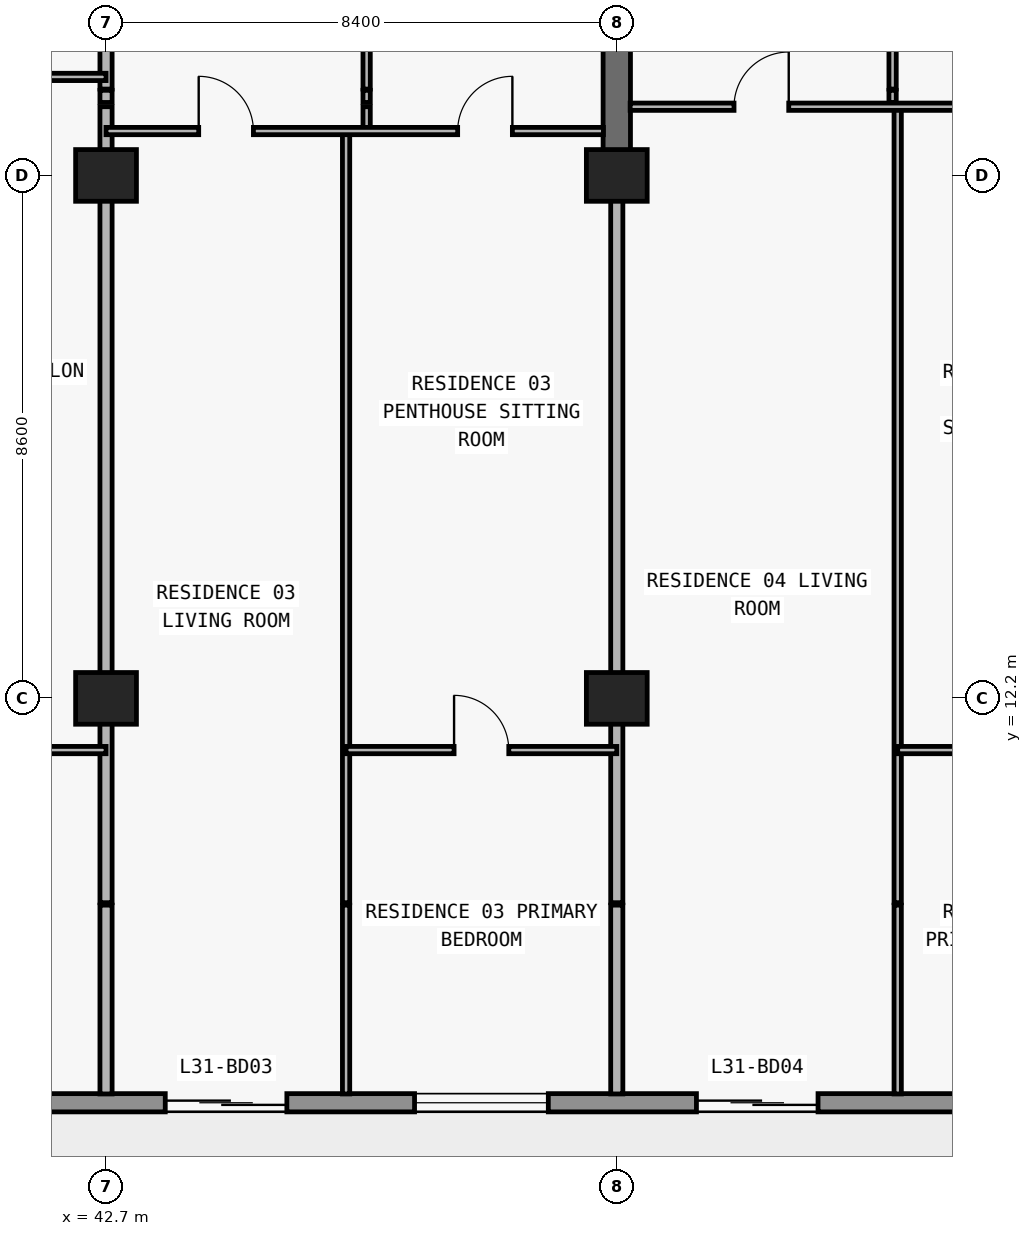
"""IFC4 building model, lengths in metres.
Left out: names, types, materials, properties, quantities, classifications, styles, units other than length and angle.
Written with IfcOpenShell. Run it as: python <this file> out.ifc"""

import sys

from ifc_helpers import new_model, si_unit, direction, frame, frame_2d, origin, origin_2d, place, context, subcontext, project, spatial, rectangle, extrude, element, fill, save


model = new_model("IFC4")
c1 = context("Model", 3, precision=1e-05, world=origin(), true_north=direction((0.0, 1.0)))
c2 = subcontext(c1, "Body", "Model", "MODEL_VIEW")
j1 = project(units=[si_unit("LENGTHUNIT", "METRE"), si_unit("PLANEANGLEUNIT", "RADIAN")], contexts=[c1])
p1 = place(None, origin())
s1 = spatial("IfcSite", under=j1, at=p1, CompositionType="ELEMENT")
p2 = place(p1, origin())
s2 = spatial("IfcBuilding", under=s1, at=p2, CompositionType="ELEMENT")
p3 = place(p2, frame((0.0, 0.0, 115.8)))
s3 = spatial("IfcBuildingStorey", under=s2, at=p3, CompositionType="ELEMENT", Elevation=115.8)
for number, where, z_axis, x_axis in (
    (1, (42.7, 12.2, 0.0), (0.0, 0.0, 1.0), (1.0, 0.0, 0.0)),
    (2, (51.1, 12.2, 0.0), (0.0, 0.0, 1.0), (1.0, 0.0, 0.0)),
    (3, (42.7, 20.8, 0.0), (0.0, 0.0, 1.0), (1.0, 0.0, 0.0)),
    (4, (51.1, 20.8, 0.0), (0.0, 0.0, 1.0), (1.0, 0.0, 0.0)),
):
    element("IfcColumn", number, at=place(p3, frame(where, z_axis=z_axis, x_axis=x_axis)), inside=s3, PredefinedType="COLUMN", context=c2, shape_type="SweptSolid", body=[
        extrude(rectangle(XDim=1.0, YDim=0.85, at=origin_2d()), origin(), (0.0, 0.0, 1.0), 3.05),
    ])
p4 = place(p3, frame((51.1, 20.8, 0.0), z_axis=(0.0, 0.0, 1.0), x_axis=(0.0, 1.0, 0.0)))
e5 = element("IfcWall", 5, at=p4, inside=s3, PredefinedType="SHEAR", context=c2, shape_type="SweptSolid", body=[
    extrude(rectangle(XDim=8.6, YDim=0.45, at=frame_2d((4.3, 0.0))), origin(), (0.0, 0.0, 1.0), 3.05),
])
p5 = place(p3, frame((70.1, 5.55, 0.0), z_axis=(0.0, 0.0, 1.0), x_axis=(-1.0, 0.0, 0.0)))
e6 = element("IfcWall", 6, at=p5, inside=s3, PredefinedType="STANDARD", context=c2, shape_type="SweptSolid", body=[
    extrude(rectangle(XDim=62.4, YDim=0.3, at=frame_2d((31.2, 0.0))), origin(), (0.0, 0.0, 1.0), 3.05),
])
p6 = place(p5, frame((57.29, 0.0, 0.0)))
e7 = element("IfcOpeningElement", 7, at=p6, cuts=e6, PredefinedType="OPENING", context=c2, shape_type="SweptSolid", body=[
    extrude(rectangle(XDim=2.0, YDim=2.3, at=frame_2d((1.0, 1.15))), frame((0.0, 0.16, 0.0), z_axis=(0.0, -1.0, 0.0), x_axis=(1.0, 0.0, 0.0)), (0.0, 0.0, 1.0), 0.32),
])
p7 = place(p5, frame((52.61, 0.0, 0.65)))
e8 = element("IfcOpeningElement", 8, at=p7, cuts=e6, PredefinedType="OPENING", context=c2, shape_type="SweptSolid", body=[
    extrude(rectangle(XDim=2.6, YDim=1.85, at=frame_2d((1.3, 0.925))), frame((0.0, 0.16, 0.0), z_axis=(0.0, -1.0, 0.0), x_axis=(1.0, 0.0, 0.0)), (0.0, 0.0, 1.0), 0.32),
])
p8 = place(p5, frame((46.5, 0.0, 0.85)))
e9 = element("IfcOpeningElement", 9, at=p8, cuts=e6, PredefinedType="OPENING", context=c2, shape_type="SweptSolid", body=[
    extrude(rectangle(XDim=2.2, YDim=1.55, at=frame_2d((1.1, 0.775))), frame((0.0, 0.16, 0.0), z_axis=(0.0, -1.0, 0.0), x_axis=(1.0, 0.0, 0.0)), (0.0, 0.0, 1.0), 0.32),
])
p9 = place(p5, frame((40.49, 0.0, 0.0)))
e10 = element("IfcOpeningElement", 10, at=p9, cuts=e6, PredefinedType="OPENING", context=c2, shape_type="SweptSolid", body=[
    extrude(rectangle(XDim=2.0, YDim=2.3, at=frame_2d((1.0, 1.15))), frame((0.0, 0.16, 0.0), z_axis=(0.0, -1.0, 0.0), x_axis=(1.0, 0.0, 0.0)), (0.0, 0.0, 1.0), 0.32),
])
p10 = place(p5, frame((35.81, 0.0, 0.65)))
e11 = element("IfcOpeningElement", 11, at=p10, cuts=e6, PredefinedType="OPENING", context=c2, shape_type="SweptSolid", body=[
    extrude(rectangle(XDim=2.6, YDim=1.85, at=frame_2d((1.3, 0.925))), frame((0.0, 0.16, 0.0), z_axis=(0.0, -1.0, 0.0), x_axis=(1.0, 0.0, 0.0)), (0.0, 0.0, 1.0), 0.32),
])
p11 = place(p5, frame((30.1, 0.0, 0.85)))
e12 = element("IfcOpeningElement", 12, at=p11, cuts=e6, PredefinedType="OPENING", context=c2, shape_type="SweptSolid", body=[
    extrude(rectangle(XDim=2.2, YDim=1.55, at=frame_2d((1.1, 0.775))), frame((0.0, 0.16, 0.0), z_axis=(0.0, -1.0, 0.0), x_axis=(1.0, 0.0, 0.0)), (0.0, 0.0, 1.0), 0.32),
])
p12 = place(p5, frame((24.426, 0.0, 0.0)))
e13 = element("IfcOpeningElement", 13, at=p12, cuts=e6, PredefinedType="OPENING", context=c2, shape_type="SweptSolid", body=[
    extrude(rectangle(XDim=2.0, YDim=2.3, at=frame_2d((1.0, 1.15))), frame((0.0, 0.16, 0.0), z_axis=(0.0, -1.0, 0.0), x_axis=(1.0, 0.0, 0.0)), (0.0, 0.0, 1.0), 0.32),
])
p13 = place(p5, frame((20.126, 0.0, 0.85)))
e14 = element("IfcOpeningElement", 14, at=p13, cuts=e6, PredefinedType="OPENING", context=c2, shape_type="SweptSolid", body=[
    extrude(rectangle(XDim=2.2, YDim=1.55, at=frame_2d((1.1, 0.775))), frame((0.0, 0.16, 0.0), z_axis=(0.0, -1.0, 0.0), x_axis=(1.0, 0.0, 0.0)), (0.0, 0.0, 1.0), 0.32),
])
p14 = place(p5, frame((15.69, 0.0, 0.0)))
e15 = element("IfcOpeningElement", 15, at=p14, cuts=e6, PredefinedType="OPENING", context=c2, shape_type="SweptSolid", body=[
    extrude(rectangle(XDim=2.0, YDim=2.3, at=frame_2d((1.0, 1.15))), frame((0.0, 0.16, 0.0), z_axis=(0.0, -1.0, 0.0), x_axis=(1.0, 0.0, 0.0)), (0.0, 0.0, 1.0), 0.32),
])
p15 = place(p5, frame((11.59, 0.0, 0.85)))
e16 = element("IfcOpeningElement", 16, at=p15, cuts=e6, PredefinedType="OPENING", context=c2, shape_type="SweptSolid", body=[
    extrude(rectangle(XDim=1.8, YDim=1.55, at=frame_2d((0.9, 0.775))), frame((0.0, 0.16, 0.0), z_axis=(0.0, -1.0, 0.0), x_axis=(1.0, 0.0, 0.0)), (0.0, 0.0, 1.0), 0.32),
])
p16 = place(p5, frame((7.626, 0.0, 0.0)))
e17 = element("IfcOpeningElement", 17, at=p16, cuts=e6, PredefinedType="OPENING", context=c2, shape_type="SweptSolid", body=[
    extrude(rectangle(XDim=2.0, YDim=2.3, at=frame_2d((1.0, 1.15))), frame((0.0, 0.16, 0.0), z_axis=(0.0, -1.0, 0.0), x_axis=(1.0, 0.0, 0.0)), (0.0, 0.0, 1.0), 0.32),
])
p17 = place(p5, frame((3.326, 0.0, 0.85)))
e18 = element("IfcOpeningElement", 18, at=p17, cuts=e6, PredefinedType="OPENING", context=c2, shape_type="SweptSolid", body=[
    extrude(rectangle(XDim=2.2, YDim=1.55, at=frame_2d((1.1, 0.775))), frame((0.0, 0.16, 0.0), z_axis=(0.0, -1.0, 0.0), x_axis=(1.0, 0.0, 0.0)), (0.0, 0.0, 1.0), 0.32),
])
p18 = place(p3, frame((42.7, 5.695, 0.0), z_axis=(0.0, 0.0, 1.0), x_axis=(0.0, 1.0, 0.0)))
e19 = element("IfcWall", 19, at=p18, inside=s3, PredefinedType="PARTITIONING", context=c2, shape_type="SweptSolid", body=[
    extrude(rectangle(XDim=3.105, YDim=0.2, at=frame_2d((1.552, 0.0))), origin(), (0.0, 0.0, 1.0), 3.05),
])
p19 = place(p3, frame((42.7, 8.84, 0.0), z_axis=(0.0, 0.0, 1.0), x_axis=(0.0, 1.0, 0.0)))
e20 = element("IfcWall", 20, at=p19, inside=s3, PredefinedType="PARTITIONING", context=c2, shape_type="SweptSolid", body=[
    extrude(rectangle(XDim=13.09, YDim=0.2, at=frame_2d((6.545, 0.0))), origin(), (0.0, 0.0, 1.0), 2.174),
])
p20 = place(p3, frame((42.7, 22.0, 0.0), z_axis=(0.0, 0.0, 1.0), x_axis=(0.0, 1.0, 0.0)))
e21 = element("IfcWall", 21, at=p20, inside=s3, PredefinedType="PARTITIONING", context=c2, shape_type="SweptSolid", body=[
    extrude(rectangle(XDim=0.2, YDim=0.2, at=frame_2d((0.1, 0.0))), origin(), (0.0, 0.0, 1.0), 2.174),
])
p21 = place(p3, frame((42.7, 22.22, 0.0), z_axis=(0.0, 0.0, 1.0), x_axis=(0.0, 1.0, 0.0)))
e22 = element("IfcWall", 22, at=p21, inside=s3, PredefinedType="PARTITIONING", context=c2, shape_type="SweptSolid", body=[
    extrude(rectangle(XDim=4.38, YDim=0.2, at=frame_2d((2.19, 0.0))), origin(), (0.0, 0.0, 1.0), 2.174),
])
p22 = place(p3, frame((46.648, 5.695, 0.0), z_axis=(0.0, 0.0, 1.0), x_axis=(0.0, 1.0, 0.0)))
e23 = element("IfcWall", 23, at=p22, inside=s3, PredefinedType="PARTITIONING", context=c2, shape_type="SweptSolid", body=[
    extrude(rectangle(XDim=3.105, YDim=0.12, at=frame_2d((1.552, 0.0))), origin(), (0.0, 0.0, 1.0), 3.05),
])
p23 = place(p3, frame((46.648, 8.84, 0.0), z_axis=(0.0, 0.0, 1.0), x_axis=(0.0, 1.0, 0.0)))
e24 = element("IfcWall", 24, at=p23, inside=s3, PredefinedType="PARTITIONING", context=c2, shape_type="SweptSolid", body=[
    extrude(rectangle(XDim=12.69, YDim=0.12, at=frame_2d((6.345, 0.0))), origin(), (0.0, 0.0, 1.0), 3.05),
])
p24 = place(p3, frame((46.986, 21.53, 0.0), z_axis=(0.0, 0.0, 1.0), x_axis=(0.0, 1.0, 0.0)))
e25 = element("IfcWall", 25, at=p24, inside=s3, PredefinedType="PARTITIONING", context=c2, shape_type="SweptSolid", body=[
    extrude(rectangle(XDim=0.4, YDim=0.12, at=frame_2d((0.2, 0.0))), origin(), (0.0, 0.0, 1.0), 3.05),
])
p25 = place(p3, frame((46.986, 22.0, 0.0), z_axis=(0.0, 0.0, 1.0), x_axis=(0.0, 1.0, 0.0)))
e26 = element("IfcWall", 26, at=p25, inside=s3, PredefinedType="PARTITIONING", context=c2, shape_type="SweptSolid", body=[
    extrude(rectangle(XDim=0.2, YDim=0.12, at=frame_2d((0.1, 0.0))), origin(), (0.0, 0.0, 1.0), 3.05),
])
p26 = place(p3, frame((46.986, 22.22, 0.0), z_axis=(0.0, 0.0, 1.0), x_axis=(0.0, 1.0, 0.0)))
e27 = element("IfcWall", 27, at=p26, inside=s3, PredefinedType="PARTITIONING", context=c2, shape_type="SweptSolid", body=[
    extrude(rectangle(XDim=4.38, YDim=0.12, at=frame_2d((2.19, 0.0))), origin(), (0.0, 0.0, 1.0), 3.05),
])
p27 = place(p26, frame((1.74, 0.0, 0.0)))
e28 = element("IfcOpeningElement", 28, at=p27, cuts=e27, PredefinedType="OPENING", context=c2, shape_type="SweptSolid", body=[
    extrude(rectangle(XDim=0.9, YDim=2.15, at=frame_2d((0.45, 1.075))), frame((0.0, 0.07, 0.0), z_axis=(0.0, -1.0, 0.0), x_axis=(1.0, 0.0, 0.0)), (0.0, 0.0, 1.0), 0.14),
])
p28 = place(p3, frame((51.1, 5.695, 0.0), z_axis=(0.0, 0.0, 1.0), x_axis=(0.0, 1.0, 0.0)))
e29 = element("IfcWall", 29, at=p28, inside=s3, PredefinedType="PARTITIONING", context=c2, shape_type="SweptSolid", body=[
    extrude(rectangle(XDim=3.105, YDim=0.2, at=frame_2d((1.552, 0.0))), origin(), (0.0, 0.0, 1.0), 3.05),
])
p29 = place(p3, frame((51.1, 8.84, 0.0), z_axis=(0.0, 0.0, 1.0), x_axis=(0.0, 1.0, 0.0)))
e30 = element("IfcWall", 30, at=p29, inside=s3, PredefinedType="PARTITIONING", context=c2, shape_type="SweptSolid", body=[
    extrude(rectangle(XDim=11.955, YDim=0.2, at=frame_2d((5.978, 0.0))), origin(), (0.0, 0.0, 1.0), 2.174),
])
p30 = place(p3, frame((55.636, 22.0, 0.0), z_axis=(0.0, 0.0, 1.0), x_axis=(0.0, 1.0, 0.0)))
e31 = element("IfcWall", 31, at=p30, inside=s3, PredefinedType="PARTITIONING", context=c2, shape_type="SweptSolid", body=[
    extrude(rectangle(XDim=0.2, YDim=0.12, at=frame_2d((0.1, 0.0))), origin(), (0.0, 0.0, 1.0), 3.05),
])
p31 = place(p3, frame((55.636, 22.22, 0.0), z_axis=(0.0, 0.0, 1.0), x_axis=(0.0, 1.0, 0.0)))
e32 = element("IfcWall", 32, at=p31, inside=s3, PredefinedType="PARTITIONING", context=c2, shape_type="SweptSolid", body=[
    extrude(rectangle(XDim=4.38, YDim=0.12, at=frame_2d((2.19, 0.0))), origin(), (0.0, 0.0, 1.0), 3.05),
])
p32 = place(p31, frame((1.74, 0.0, 0.0)))
e33 = element("IfcOpeningElement", 33, at=p32, cuts=e32, PredefinedType="OPENING", context=c2, shape_type="SweptSolid", body=[
    extrude(rectangle(XDim=0.9, YDim=2.15, at=frame_2d((0.45, 1.075))), frame((0.0, 0.07, 0.0), z_axis=(0.0, -1.0, 0.0), x_axis=(1.0, 0.0, 0.0)), (0.0, 0.0, 1.0), 0.14),
])
p33 = place(p3, frame((55.72, 5.695, 0.0), z_axis=(0.0, 0.0, 1.0), x_axis=(0.0, 1.0, 0.0)))
e34 = element("IfcWall", 34, at=p33, inside=s3, PredefinedType="PARTITIONING", context=c2, shape_type="SweptSolid", body=[
    extrude(rectangle(XDim=3.105, YDim=0.12, at=frame_2d((1.552, 0.0))), origin(), (0.0, 0.0, 1.0), 3.05),
])
p34 = place(p3, frame((55.72, 8.84, 0.0), z_axis=(0.0, 0.0, 1.0), x_axis=(0.0, 1.0, 0.0)))
e35 = element("IfcWall", 35, at=p34, inside=s3, PredefinedType="PARTITIONING", context=c2, shape_type="SweptSolid", body=[
    extrude(rectangle(XDim=13.09, YDim=0.12, at=frame_2d((6.545, 0.0))), origin(), (0.0, 0.0, 1.0), 3.05),
])
p35 = place(p3, frame((35.1, 11.35, 0.0), z_axis=(0.0, 0.0, 1.0), x_axis=(1.0, 0.0, 0.0)))
e36 = element("IfcWall", 36, at=p35, inside=s3, PredefinedType="PARTITIONING", context=c2, shape_type="SweptSolid", body=[
    extrude(rectangle(XDim=7.6, YDim=0.12, at=frame_2d((3.8, 0.0))), origin(), (0.0, 0.0, 1.0), 3.05),
])
p36 = place(p35, frame((3.35, 0.0, 0.0)))
e37 = element("IfcOpeningElement", 37, at=p36, cuts=e36, PredefinedType="OPENING", context=c2, shape_type="SweptSolid", body=[
    extrude(rectangle(XDim=0.9, YDim=2.15, at=frame_2d((0.45, 1.075))), frame((0.0, 0.07, 0.0), z_axis=(0.0, -1.0, 0.0), x_axis=(1.0, 0.0, 0.0)), (0.0, 0.0, 1.0), 0.14),
])
p37 = place(p3, frame((46.648, 11.35, 0.0), z_axis=(0.0, 0.0, 1.0), x_axis=(1.0, 0.0, 0.0)))
e38 = element("IfcWall", 38, at=p37, inside=s3, PredefinedType="PARTITIONING", context=c2, shape_type="SweptSolid", body=[
    extrude(rectangle(XDim=4.452, YDim=0.12, at=frame_2d((2.226, 0.0))), origin(), (0.0, 0.0, 1.0), 3.05),
])
p38 = place(p37, frame((1.776, 0.0, 0.0)))
e39 = element("IfcOpeningElement", 39, at=p38, cuts=e38, PredefinedType="OPENING", context=c2, shape_type="SweptSolid", body=[
    extrude(rectangle(XDim=0.9, YDim=2.15, at=frame_2d((0.45, 1.075))), frame((0.0, 0.07, 0.0), z_axis=(0.0, -1.0, 0.0), x_axis=(1.0, 0.0, 0.0)), (0.0, 0.0, 1.0), 0.14),
])
p39 = place(p3, frame((55.72, 11.35, 0.0), z_axis=(0.0, 0.0, 1.0), x_axis=(1.0, 0.0, 0.0)))
e40 = element("IfcWall", 40, at=p39, inside=s3, PredefinedType="PARTITIONING", context=c2, shape_type="SweptSolid", body=[
    extrude(rectangle(XDim=3.78, YDim=0.12, at=frame_2d((1.89, 0.0))), origin(), (0.0, 0.0, 1.0), 3.05),
])
p40 = place(p39, frame((1.44, 0.0, 0.0)))
e41 = element("IfcOpeningElement", 41, at=p40, cuts=e40, PredefinedType="OPENING", context=c2, shape_type="SweptSolid", body=[
    extrude(rectangle(XDim=0.9, YDim=2.15, at=frame_2d((0.45, 1.075))), frame((0.0, 0.07, 0.0), z_axis=(0.0, -1.0, 0.0), x_axis=(1.0, 0.0, 0.0)), (0.0, 0.0, 1.0), 0.14),
])
p41 = place(p3, frame((42.7, 21.53, 0.0), z_axis=(0.0, 0.0, 1.0), x_axis=(1.0, 0.0, 0.0)))
e42 = element("IfcWall", 42, at=p41, inside=s3, PredefinedType="PARTITIONING", context=c2, shape_type="SweptSolid", body=[
    extrude(rectangle(XDim=8.18, YDim=0.12, at=frame_2d((4.09, 0.0))), origin(), (0.0, 0.0, 1.0), 3.05),
])
p42 = place(p41, frame((1.524, 0.0, 0.0)))
e43 = element("IfcOpeningElement", 43, at=p42, cuts=e42, PredefinedType="OPENING", context=c2, shape_type="SweptSolid", body=[
    extrude(rectangle(XDim=0.9, YDim=2.15, at=frame_2d((0.45, 1.075))), frame((0.0, 0.07, 0.0), z_axis=(0.0, -1.0, 0.0), x_axis=(1.0, 0.0, 0.0)), (0.0, 0.0, 1.0), 0.14),
])
p43 = place(p41, frame((5.783, 0.0, 0.0)))
e44 = element("IfcOpeningElement", 44, at=p43, cuts=e42, PredefinedType="OPENING", context=c2, shape_type="SweptSolid", body=[
    extrude(rectangle(XDim=0.9, YDim=2.15, at=frame_2d((0.45, 1.075))), frame((0.0, 0.07, 0.0), z_axis=(0.0, -1.0, 0.0), x_axis=(1.0, 0.0, 0.0)), (0.0, 0.0, 1.0), 0.14),
])
p44 = place(p3, frame((51.32, 21.93, 0.0), z_axis=(0.0, 0.0, 1.0), x_axis=(1.0, 0.0, 0.0)))
e45 = element("IfcWall", 45, at=p44, inside=s3, PredefinedType="PARTITIONING", context=c2, shape_type="SweptSolid", body=[
    extrude(rectangle(XDim=8.18, YDim=0.12, at=frame_2d((4.09, 0.0))), origin(), (0.0, 0.0, 1.0), 3.05),
])
p45 = place(p44, frame((1.708, 0.0, 0.0)))
e46 = element("IfcOpeningElement", 46, at=p45, cuts=e45, PredefinedType="OPENING", context=c2, shape_type="SweptSolid", body=[
    extrude(rectangle(XDim=0.9, YDim=2.15, at=frame_2d((0.45, 1.075))), frame((0.0, 0.07, 0.0), z_axis=(0.0, -1.0, 0.0), x_axis=(1.0, 0.0, 0.0)), (0.0, 0.0, 1.0), 0.14),
])
p46 = place(p44, frame((5.84, 0.0, 0.0)))
e47 = element("IfcOpeningElement", 47, at=p46, cuts=e45, PredefinedType="OPENING", context=c2, shape_type="SweptSolid", body=[
    extrude(rectangle(XDim=0.9, YDim=2.15, at=frame_2d((0.45, 1.075))), frame((0.0, 0.07, 0.0), z_axis=(0.0, -1.0, 0.0), x_axis=(1.0, 0.0, 0.0)), (0.0, 0.0, 1.0), 0.14),
])
p47 = place(p3, frame((35.1, 22.42, 0.0), z_axis=(0.0, 0.0, 1.0), x_axis=(1.0, 0.0, 0.0)))
e48 = element("IfcWall", 48, at=p47, inside=s3, PredefinedType="PARTITIONING", context=c2, shape_type="SweptSolid", body=[
    extrude(rectangle(XDim=7.6, YDim=0.12, at=frame_2d((3.8, 0.0))), origin(), (0.0, 0.0, 1.0), 3.05),
])
p48 = place(p47, frame((3.35, 0.0, 0.0)))
e49 = element("IfcOpeningElement", 49, at=p48, cuts=e48, PredefinedType="OPENING", context=c2, shape_type="SweptSolid", body=[
    extrude(rectangle(XDim=0.9, YDim=2.15, at=frame_2d((0.45, 1.075))), frame((0.0, 0.07, 0.0), z_axis=(0.0, -1.0, 0.0), x_axis=(1.0, 0.0, 0.0)), (0.0, 0.0, 1.0), 0.14),
])
p49 = place(p12, origin())
e50 = element("IfcDoor", 50, at=p49, inside=s3, OperationType="DOUBLE_DOOR_SLIDING", PredefinedType="DOOR", context=c2, shape_type="SweptSolid", body=[
    extrude(rectangle(XDim=2.0, YDim=2.3, at=frame_2d((1.0, 1.15))), frame((0.0, 0.025, 0.0), z_axis=(0.0, -1.0, 0.0), x_axis=(1.0, 0.0, 0.0)), (0.0, 0.0, 1.0), 0.05),
])
fill(e13, e50)
p50 = place(p13, origin())
e51 = element("IfcWindow", 51, at=p50, inside=s3, PartitioningType="SINGLE_PANEL", PredefinedType="WINDOW", context=c2, shape_type="SweptSolid", body=[
    extrude(rectangle(XDim=2.2, YDim=1.55, at=frame_2d((1.1, 0.775))), frame((0.0, 0.03, 0.0), z_axis=(0.0, -1.0, 0.0), x_axis=(1.0, 0.0, 0.0)), (0.0, 0.0, 1.0), 0.06),
])
fill(e14, e51)
p51 = place(p14, origin())
e52 = element("IfcDoor", 52, at=p51, inside=s3, OperationType="DOUBLE_DOOR_SLIDING", PredefinedType="DOOR", context=c2, shape_type="SweptSolid", body=[
    extrude(rectangle(XDim=2.0, YDim=2.3, at=frame_2d((1.0, 1.15))), frame((0.0, 0.025, 0.0), z_axis=(0.0, -1.0, 0.0), x_axis=(1.0, 0.0, 0.0)), (0.0, 0.0, 1.0), 0.05),
])
fill(e15, e52)
p52 = place(p42, origin())
e53 = element("IfcDoor", 53, at=p52, inside=s3, OperationType="SINGLE_SWING_LEFT", PredefinedType="DOOR", context=c2, shape_type="SweptSolid", body=[
    extrude(rectangle(XDim=0.9, YDim=2.15, at=frame_2d((0.45, 1.075))), frame((0.0, 0.025, 0.0), z_axis=(0.0, -1.0, 0.0), x_axis=(1.0, 0.0, 0.0)), (0.0, 0.0, 1.0), 0.05),
])
fill(e43, e53)
p53 = place(p43, origin())
e54 = element("IfcDoor", 54, at=p53, inside=s3, OperationType="SINGLE_SWING_RIGHT", PredefinedType="DOOR", context=c2, shape_type="SweptSolid", body=[
    extrude(rectangle(XDim=0.9, YDim=2.15, at=frame_2d((0.45, 1.075))), frame((0.0, 0.025, 0.0), z_axis=(0.0, -1.0, 0.0), x_axis=(1.0, 0.0, 0.0)), (0.0, 0.0, 1.0), 0.05),
])
fill(e44, e54)
p54 = place(p38, origin())
e55 = element("IfcDoor", 55, at=p54, inside=s3, OperationType="SINGLE_SWING_LEFT", PredefinedType="DOOR", context=c2, shape_type="SweptSolid", body=[
    extrude(rectangle(XDim=0.9, YDim=2.15, at=frame_2d((0.45, 1.075))), frame((0.0, 0.025, 0.0), z_axis=(0.0, -1.0, 0.0), x_axis=(1.0, 0.0, 0.0)), (0.0, 0.0, 1.0), 0.05),
])
fill(e39, e55)
p55 = place(p45, origin())
e56 = element("IfcDoor", 56, at=p55, inside=s3, OperationType="SINGLE_SWING_RIGHT", PredefinedType="DOOR", context=c2, shape_type="SweptSolid", body=[
    extrude(rectangle(XDim=0.9, YDim=2.15, at=frame_2d((0.45, 1.075))), frame((0.0, 0.025, 0.0), z_axis=(0.0, -1.0, 0.0), x_axis=(1.0, 0.0, 0.0)), (0.0, 0.0, 1.0), 0.05),
])
fill(e46, e56)
save(model, sys.argv[1])
